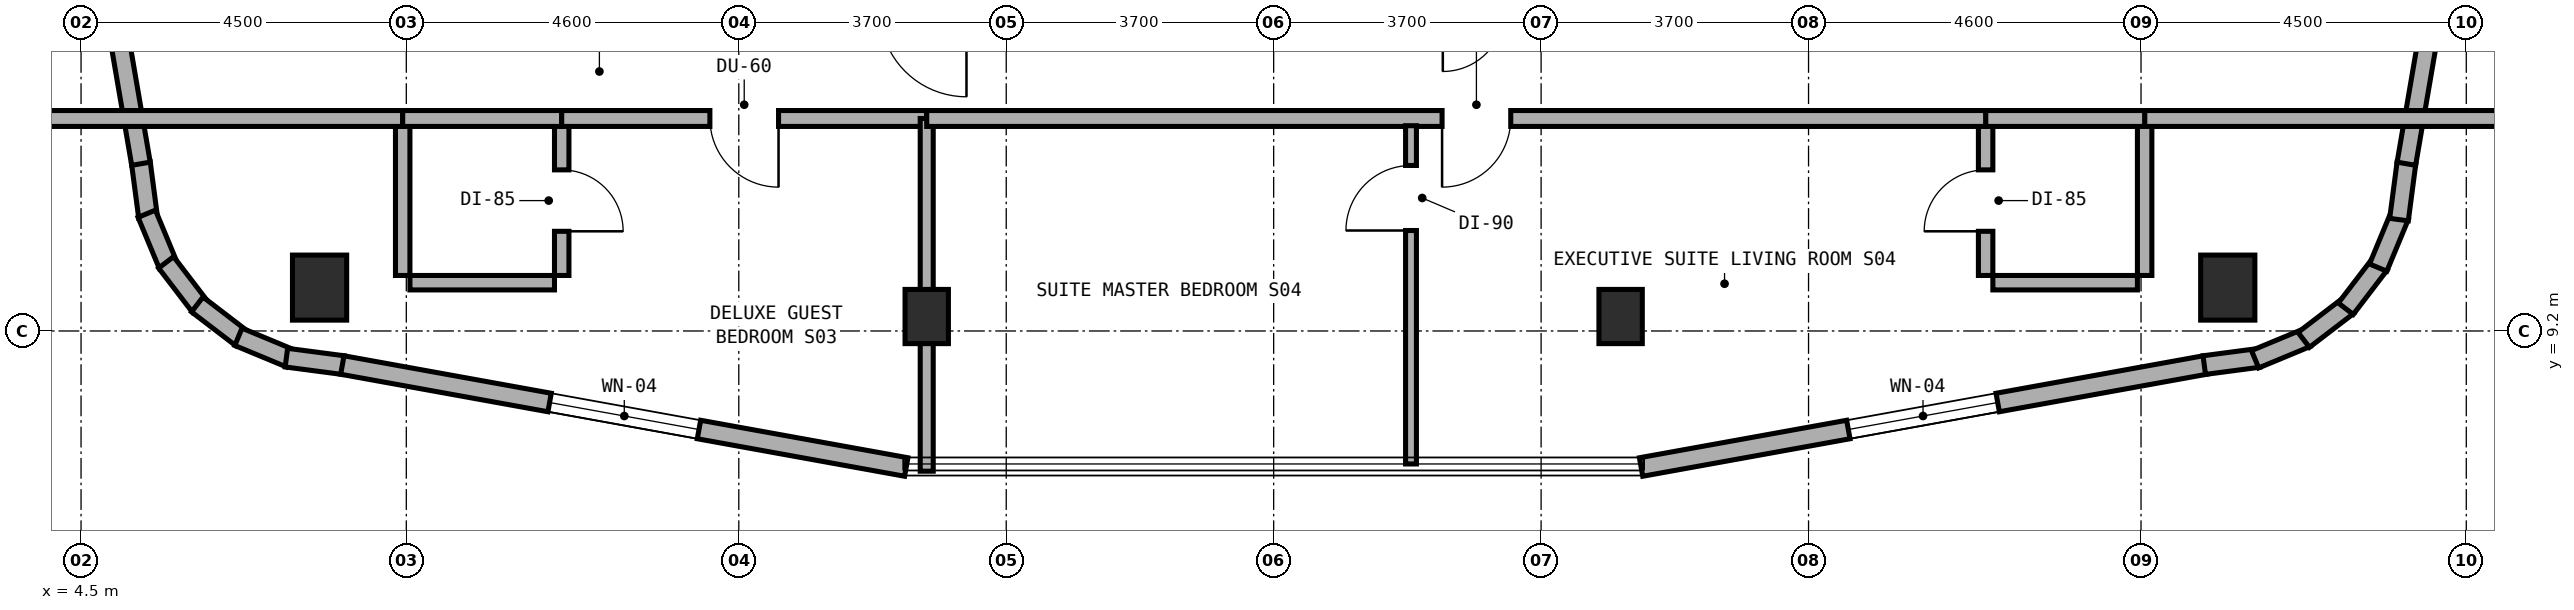
"""IFC4 building model, lengths in metres.
Left out: names, types, materials, properties, quantities, classifications, styles, units other than length and angle.
Written with IfcOpenShell. Run it as: python <this file> out.ifc"""

import sys

from ifc_helpers import new_model, si_unit, direction, frame, frame_2d, origin, origin_2d, place, context, subcontext, project, spatial, rectangle, extrude, element, fill, save


model = new_model("IFC4")
c1 = context("Model", 3, precision=1e-05, world=origin(), true_north=direction((0.0, 1.0)))
c2 = subcontext(c1, "Body", "Model", "MODEL_VIEW")
j1 = project(units=[si_unit("LENGTHUNIT", "METRE"), si_unit("PLANEANGLEUNIT", "RADIAN")], contexts=[c1])
p1 = place(None, origin())
s1 = spatial("IfcSite", under=j1, at=p1, CompositionType="ELEMENT")
p2 = place(p1, origin())
s2 = spatial("IfcBuilding", under=s1, at=p2, CompositionType="ELEMENT")
p3 = place(p2, frame((0.0, 0.0, 257.6)))
s3 = spatial("IfcBuildingStorey", under=s2, at=p3, CompositionType="ELEMENT", Elevation=257.6)
for number, where, z_axis, x_axis in (
    (1, (16.2, 9.4, 0.0), (0.0, 0.0, 1.0), (1.0, 0.0, 0.0)),
    (2, (25.8, 9.4, 0.0), (0.0, 0.0, 1.0), (1.0, 0.0, 0.0)),
):
    element("IfcColumn", number, at=place(p3, frame(where, z_axis=z_axis, x_axis=x_axis)), inside=s3, PredefinedType="COLUMN", context=c2, shape_type="SweptSolid", body=[
        extrude(rectangle(XDim=0.6, YDim=0.75, at=origin_2d()), origin(), (0.0, 0.0, 1.0), 3.6),
    ])
for number, where, z_axis, x_axis in (
    (3, (7.8, 9.8, 0.0), (0.0, 0.0, 1.0), (1.0, 0.0, 0.0)),
    (4, (34.2, 9.8, 0.0), (0.0, 0.0, 1.0), (1.0, 0.0, 0.0)),
):
    element("IfcColumn", number, at=place(p3, frame(where, z_axis=z_axis, x_axis=x_axis)), inside=s3, PredefinedType="COLUMN", context=c2, shape_type="SweptSolid", body=[
        extrude(rectangle(XDim=0.75, YDim=0.9, at=origin_2d()), origin(), (0.0, 0.0, 1.0), 3.6),
    ])
p4 = place(p3, frame((5.328, 11.525, 0.0), z_axis=(0.0, 0.0, 1.0), x_axis=(0.131190038694, -0.991357238208, 0.0)))
e5 = element("IfcWall", 5, at=p4, inside=s3, PredefinedType="STANDARD", context=c2, shape_type="SweptSolid", body=[
    extrude(rectangle(XDim=0.756, YDim=0.26, at=frame_2d((0.378, 0.0))), origin(), (0.0, 0.0, 1.0), 3.32),
])
p5 = place(p3, frame((5.409, 10.822, 0.0), z_axis=(0.0, 0.0, 1.0), x_axis=(0.383515061956, -0.923534621578, 0.0)))
e6 = element("IfcWall", 6, at=p5, inside=s3, PredefinedType="STANDARD", context=c2, shape_type="SweptSolid", body=[
    extrude(rectangle(XDim=0.772, YDim=0.26, at=frame_2d((0.386, 0.0))), origin(), (0.0, 0.0, 1.0), 3.32),
])
for number, where, z_axis, x_axis in (
    (7, (5.677, 10.149, 0.0), (0.0, 0.0, 1.0), (0.608, -0.794, 0.0)),
    (8, (6.108, 9.567, 0.0), (0.0, 0.0, 1.0), (0.794, -0.608, 0.0)),
    (9, (6.677, 9.119, 0.0), (0.0, 0.0, 1.0), (0.924, -0.383, 0.0)),
):
    element("IfcWall", number, at=place(p3, frame(where, z_axis=z_axis, x_axis=x_axis)), inside=s3, PredefinedType="STANDARD", context=c2, shape_type="SweptSolid", body=[
        extrude(rectangle(XDim=0.772, YDim=0.26, at=frame_2d((0.386, 0.0))), origin(), (0.0, 0.0, 1.0), 3.32),
    ])
p6 = place(p3, frame((7.341, 8.831, 0.0), z_axis=(0.0, 0.0, 1.0), x_axis=(0.991474252313, -0.130302751316, 0.0)))
e10 = element("IfcWall", 10, at=p6, inside=s3, PredefinedType="STANDARD", context=c2, shape_type="SweptSolid", body=[
    extrude(rectangle(XDim=0.791, YDim=0.26, at=frame_2d((0.396, 0.0))), origin(), (0.0, 0.0, 1.0), 3.32),
])
p7 = place(p3, frame((8.115, 8.729, 0.0), z_axis=(0.0, 0.0, 1.0), x_axis=(0.984039441158, -0.177950493803, 0.0)))
e11 = element("IfcWall", 11, at=p7, inside=s3, PredefinedType="STANDARD", context=c2, shape_type="SweptSolid", body=[
    extrude(rectangle(XDim=7.928, YDim=0.26, at=frame_2d((3.964, 0.0))), origin(), (0.0, 0.0, 1.0), 3.32),
])
p8 = place(p7, frame((2.914, 0.0, 0.85)))
e12 = element("IfcOpeningElement", 12, at=p8, cuts=e11, PredefinedType="OPENING", context=c2, shape_type="SweptSolid", body=[
    extrude(rectangle(XDim=2.1, YDim=1.5, at=frame_2d((1.05, 0.75))), frame((0.0, 0.14, 0.0), z_axis=(0.0, -1.0, 0.0), x_axis=(1.0, 0.0, 0.0)), (0.0, 0.0, 1.0), 0.28),
])
p9 = place(p3, frame((26.083, 7.318, 0.0), z_axis=(0.0, 0.0, 1.0), x_axis=(0.984039441158, 0.177950493803, 0.0)))
e13 = element("IfcWall", 13, at=p9, inside=s3, PredefinedType="STANDARD", context=c2, shape_type="SweptSolid", body=[
    extrude(rectangle(XDim=7.928, YDim=0.26, at=frame_2d((3.964, 0.0))), origin(), (0.0, 0.0, 1.0), 3.32),
])
p10 = place(p9, frame((2.914, 0.0, 0.85)))
e14 = element("IfcOpeningElement", 14, at=p10, cuts=e13, PredefinedType="OPENING", context=c2, shape_type="SweptSolid", body=[
    extrude(rectangle(XDim=2.1, YDim=1.5, at=frame_2d((1.05, 0.75))), frame((0.0, 0.14, 0.0), z_axis=(0.0, -1.0, 0.0), x_axis=(1.0, 0.0, 0.0)), (0.0, 0.0, 1.0), 0.28),
])
p11 = place(p3, frame((33.875, 8.728, 0.0), z_axis=(0.0, 0.0, 1.0), x_axis=(0.99139921394, 0.130872451645, 0.0)))
e15 = element("IfcWall", 15, at=p11, inside=s3, PredefinedType="STANDARD", context=c2, shape_type="SweptSolid", body=[
    extrude(rectangle(XDim=0.756, YDim=0.26, at=frame_2d((0.378, 0.0))), origin(), (0.0, 0.0, 1.0), 3.32),
])
for number, where, z_axis, x_axis in (
    (16, (34.578, 8.809, 0.0), (0.0, 0.0, 1.0), (0.924, 0.383, 0.0)),
    (17, (35.251, 9.077, 0.0), (0.0, 0.0, 1.0), (0.794, 0.608, 0.0)),
    (18, (35.833, 9.508, 0.0), (0.0, 0.0, 1.0), (0.608, 0.794, 0.0)),
    (19, (36.281, 10.077, 0.0), (0.0, 0.0, 1.0), (0.383, 0.924, 0.0)),
):
    element("IfcWall", number, at=place(p3, frame(where, z_axis=z_axis, x_axis=x_axis)), inside=s3, PredefinedType="STANDARD", context=c2, shape_type="SweptSolid", body=[
        extrude(rectangle(XDim=0.772, YDim=0.26, at=frame_2d((0.386, 0.0))), origin(), (0.0, 0.0, 1.0), 3.32),
    ])
p12 = place(p3, frame((36.569, 10.741, 0.0), z_axis=(0.0, 0.0, 1.0), x_axis=(0.130302751316, 0.991474252313, 0.0)))
e20 = element("IfcWall", 20, at=p12, inside=s3, PredefinedType="STANDARD", context=c2, shape_type="SweptSolid", body=[
    extrude(rectangle(XDim=0.791, YDim=0.26, at=frame_2d((0.396, 0.0))), origin(), (0.0, 0.0, 1.0), 3.32),
])
p13 = place(p3, frame((36.671, 11.514, 0.0), z_axis=(0.0, 0.0, 1.0), x_axis=(0.169038545376, 0.985609440994, 0.0)))
e21 = element("IfcWall", 21, at=p13, inside=s3, PredefinedType="STANDARD", context=c2, shape_type="SweptSolid", body=[
    extrude(rectangle(XDim=8.342, YDim=0.26, at=frame_2d((4.171, 0.0))), origin(), (0.0, 0.0, 1.0), 3.32),
])
p14 = place(p13, frame((4.156, 0.0, 0.85)))
e22 = element("IfcOpeningElement", 22, at=p14, cuts=e21, PredefinedType="OPENING", context=c2, shape_type="SweptSolid", body=[
    extrude(rectangle(XDim=2.1, YDim=1.5, at=frame_2d((1.05, 0.75))), frame((0.0, 0.14, 0.0), z_axis=(0.0, -1.0, 0.0), x_axis=(1.0, 0.0, 0.0)), (0.0, 0.0, 1.0), 0.28),
])
p15 = place(p3, frame((3.919, 19.736, 0.0), z_axis=(0.0, 0.0, 1.0), x_axis=(0.169038545376, -0.985609440994, 0.0)))
e23 = element("IfcWall", 23, at=p15, inside=s3, PredefinedType="STANDARD", context=c2, shape_type="SweptSolid", body=[
    extrude(rectangle(XDim=8.342, YDim=0.26, at=frame_2d((4.171, 0.0))), origin(), (0.0, 0.0, 1.0), 3.32),
])
p16 = place(p15, frame((2.746, 0.0, 0.85)))
e24 = element("IfcOpeningElement", 24, at=p16, cuts=e23, PredefinedType="OPENING", context=c2, shape_type="SweptSolid", body=[
    extrude(rectangle(XDim=2.1, YDim=1.5, at=frame_2d((1.05, 0.75))), frame((0.0, 0.14, 0.0), z_axis=(0.0, -1.0, 0.0), x_axis=(1.0, 0.0, 0.0)), (0.0, 0.0, 1.0), 0.28),
])
p17 = place(p3, frame((11.15, 9.968, 0.0), z_axis=(0.0, 0.0, 1.0), x_axis=(0.0, 1.0, 0.0)))
e25 = element("IfcWall", 25, at=p17, inside=s3, PredefinedType="PLUMBINGWALL", context=c2, shape_type="SweptSolid", body=[
    extrude(rectangle(XDim=2.072, YDim=0.2, at=frame_2d((1.036, 0.0))), origin(), (0.0, 0.0, 1.0), 2.895),
])
p18 = place(p17, frame((0.611, 0.0, 0.0)))
e26 = element("IfcOpeningElement", 26, at=p18, cuts=e25, PredefinedType="OPENING", context=c2, shape_type="SweptSolid", body=[
    extrude(rectangle(XDim=0.85, YDim=2.1, at=frame_2d((0.425, 1.05))), frame((0.0, 0.11, 0.0), z_axis=(0.0, -1.0, 0.0), x_axis=(1.0, 0.0, 0.0)), (0.0, 0.0, 1.0), 0.22),
])
p19 = place(p3, frame((9.05, 9.868, 0.0), z_axis=(0.0, 0.0, 1.0), x_axis=(1.0, 0.0, 0.0)))
e27 = element("IfcWall", 27, at=p19, inside=s3, PredefinedType="PLUMBINGWALL", context=c2, shape_type="SweptSolid", body=[
    extrude(rectangle(XDim=2.0, YDim=0.2, at=frame_2d((1.0, 0.0))), origin(), (0.0, 0.0, 1.0), 3.015),
])
p20 = place(p3, frame((8.95, 9.968, 0.0), z_axis=(0.0, 0.0, 1.0), x_axis=(0.0, 1.0, 0.0)))
e28 = element("IfcWall", 28, at=p20, inside=s3, PredefinedType="PLUMBINGWALL", context=c2, shape_type="SweptSolid", body=[
    extrude(rectangle(XDim=2.072, YDim=0.2, at=frame_2d((1.036, 0.0))), origin(), (0.0, 0.0, 1.0), 2.895),
])
p21 = place(p3, frame((3.96, 12.14, 0.0), z_axis=(0.0, 0.0, 1.0), x_axis=(1.0, 0.0, 0.0)))
e29 = element("IfcWall", 29, at=p21, inside=s3, PredefinedType="SOLIDWALL", context=c2, shape_type="SweptSolid", body=[
    extrude(rectangle(XDim=4.99, YDim=0.22, at=frame_2d((2.495, 0.0))), origin(), (0.0, 0.0, 1.0), 2.795),
])
p22 = place(p3, frame((8.95, 12.14, 0.0), z_axis=(0.0, 0.0, 1.0), x_axis=(1.0, 0.0, 0.0)))
e30 = element("IfcWall", 30, at=p22, inside=s3, PredefinedType="SOLIDWALL", context=c2, shape_type="SweptSolid", body=[
    extrude(rectangle(XDim=2.2, YDim=0.22, at=frame_2d((1.1, 0.0))), origin(), (0.0, 0.0, 1.0), 3.32),
])
p23 = place(p3, frame((11.15, 12.14, 0.0), z_axis=(0.0, 0.0, 1.0), x_axis=(1.0, 0.0, 0.0)))
e31 = element("IfcWall", 31, at=p23, inside=s3, PredefinedType="SOLIDWALL", context=c2, shape_type="SweptSolid", body=[
    extrude(rectangle(XDim=5.05, YDim=0.22, at=frame_2d((2.525, 0.0))), origin(), (0.0, 0.0, 1.0), 2.795),
])
p24 = place(p23, frame((2.05, 0.0, 0.0)))
e32 = element("IfcOpeningElement", 32, at=p24, cuts=e31, PredefinedType="OPENING", context=c2, shape_type="SweptSolid", body=[
    extrude(rectangle(XDim=0.95, YDim=2.1, at=frame_2d((0.475, 1.05))), frame((0.0, 0.12, 0.0), z_axis=(0.0, -1.0, 0.0), x_axis=(1.0, 0.0, 0.0)), (0.0, 0.0, 1.0), 0.24),
])
p25 = place(p3, frame((16.2, 7.26, 0.0), z_axis=(0.0, 0.0, 1.0), x_axis=(0.0, 1.0, 0.0)))
e33 = element("IfcWall", 33, at=p25, inside=s3, PredefinedType="SOLIDWALL", context=c2, shape_type="SweptSolid", body=[
    extrude(rectangle(XDim=4.88, YDim=0.18, at=frame_2d((2.44, 0.0))), origin(), (0.0, 0.0, 1.0), 2.795),
])
p26 = place(p3, frame((30.85, 9.968, 0.0), z_axis=(0.0, 0.0, 1.0), x_axis=(0.0, 1.0, 0.0)))
e34 = element("IfcWall", 34, at=p26, inside=s3, PredefinedType="PLUMBINGWALL", context=c2, shape_type="SweptSolid", body=[
    extrude(rectangle(XDim=2.072, YDim=0.2, at=frame_2d((1.036, 0.0))), origin(), (0.0, 0.0, 1.0), 2.895),
])
p27 = place(p26, frame((0.611, 0.0, 0.0)))
e35 = element("IfcOpeningElement", 35, at=p27, cuts=e34, PredefinedType="OPENING", context=c2, shape_type="SweptSolid", body=[
    extrude(rectangle(XDim=0.85, YDim=2.1, at=frame_2d((0.425, 1.05))), frame((0.0, 0.11, 0.0), z_axis=(0.0, -1.0, 0.0), x_axis=(1.0, 0.0, 0.0)), (0.0, 0.0, 1.0), 0.22),
])
p28 = place(p3, frame((30.95, 9.868, 0.0), z_axis=(0.0, 0.0, 1.0), x_axis=(1.0, 0.0, 0.0)))
e36 = element("IfcWall", 36, at=p28, inside=s3, PredefinedType="PLUMBINGWALL", context=c2, shape_type="SweptSolid", body=[
    extrude(rectangle(XDim=2.0, YDim=0.2, at=frame_2d((1.0, 0.0))), origin(), (0.0, 0.0, 1.0), 3.015),
])
p29 = place(p3, frame((33.05, 9.968, 0.0), z_axis=(0.0, 0.0, 1.0), x_axis=(0.0, 1.0, 0.0)))
e37 = element("IfcWall", 37, at=p29, inside=s3, PredefinedType="PLUMBINGWALL", context=c2, shape_type="SweptSolid", body=[
    extrude(rectangle(XDim=2.072, YDim=0.2, at=frame_2d((1.036, 0.0))), origin(), (0.0, 0.0, 1.0), 2.895),
])
p30 = place(p3, frame((33.05, 12.14, 0.0), z_axis=(0.0, 0.0, 1.0), x_axis=(1.0, 0.0, 0.0)))
e38 = element("IfcWall", 38, at=p30, inside=s3, PredefinedType="SOLIDWALL", context=c2, shape_type="SweptSolid", body=[
    extrude(rectangle(XDim=4.99, YDim=0.22, at=frame_2d((2.495, 0.0))), origin(), (0.0, 0.0, 1.0), 2.795),
])
p31 = place(p3, frame((30.85, 12.14, 0.0), z_axis=(0.0, 0.0, 1.0), x_axis=(1.0, 0.0, 0.0)))
e39 = element("IfcWall", 39, at=p31, inside=s3, PredefinedType="SOLIDWALL", context=c2, shape_type="SweptSolid", body=[
    extrude(rectangle(XDim=2.2, YDim=0.22, at=frame_2d((1.1, 0.0))), origin(), (0.0, 0.0, 1.0), 3.32),
])
p32 = place(p3, frame((16.2, 12.14, 0.0), z_axis=(0.0, 0.0, 1.0), x_axis=(1.0, 0.0, 0.0)))
e40 = element("IfcWall", 40, at=p32, inside=s3, PredefinedType="SOLIDWALL", context=c2, shape_type="SweptSolid", body=[
    extrude(rectangle(XDim=14.65, YDim=0.22, at=frame_2d((7.325, 0.0))), origin(), (0.0, 0.0, 1.0), 2.795),
])
p33 = place(p32, frame((7.13, 0.0, 0.0)))
e41 = element("IfcOpeningElement", 41, at=p33, cuts=e40, PredefinedType="OPENING", context=c2, shape_type="SweptSolid", body=[
    extrude(rectangle(XDim=0.95, YDim=2.1, at=frame_2d((0.475, 1.05))), frame((0.0, 0.12, 0.0), z_axis=(0.0, -1.0, 0.0), x_axis=(1.0, 0.0, 0.0)), (0.0, 0.0, 1.0), 0.24),
])
p34 = place(p3, frame((22.9, 7.36, 0.0), z_axis=(0.0, 0.0, 1.0), x_axis=(0.0, 1.0, 0.0)))
e42 = element("IfcWall", 42, at=p34, inside=s3, PredefinedType="PARTITIONING", context=c2, shape_type="SweptSolid", body=[
    extrude(rectangle(XDim=4.68, YDim=0.15, at=frame_2d((2.34, 0.0))), origin(), (0.0, 0.0, 1.0), 2.895),
])
p35 = place(p34, frame((3.23, 0.0, 0.0)))
e43 = element("IfcOpeningElement", 43, at=p35, cuts=e42, PredefinedType="OPENING", context=c2, shape_type="SweptSolid", body=[
    extrude(rectangle(XDim=0.9, YDim=2.1, at=frame_2d((0.45, 1.05))), frame((0.0, 0.085, 0.0), z_axis=(0.0, -1.0, 0.0), x_axis=(1.0, 0.0, 0.0)), (0.0, 0.0, 1.0), 0.17),
])
p36 = place(p8, origin())
e44 = element("IfcWindow", 44, at=p36, inside=s3, PartitioningType="SINGLE_PANEL", PredefinedType="WINDOW", context=c2, shape_type="SweptSolid", body=[
    extrude(rectangle(XDim=2.1, YDim=1.5, at=frame_2d((1.05, 0.75))), frame((0.0, 0.03, 0.0), z_axis=(0.0, -1.0, 0.0), x_axis=(1.0, 0.0, 0.0)), (0.0, 0.0, 1.0), 0.06),
])
fill(e12, e44)
p37 = place(p10, origin())
e45 = element("IfcWindow", 45, at=p37, inside=s3, PartitioningType="SINGLE_PANEL", PredefinedType="WINDOW", context=c2, shape_type="SweptSolid", body=[
    extrude(rectangle(XDim=2.1, YDim=1.5, at=frame_2d((1.05, 0.75))), frame((0.0, 0.03, 0.0), z_axis=(0.0, -1.0, 0.0), x_axis=(1.0, 0.0, 0.0)), (0.0, 0.0, 1.0), 0.06),
])
fill(e14, e45)
p38 = place(p18, frame((0.85, 0.0, 0.0), z_axis=(0.0, 0.0, 1.0), x_axis=(-1.0, 0.0, 0.0)))
e46 = element("IfcDoor", 46, at=p38, inside=s3, OperationType="SINGLE_SWING_RIGHT", PredefinedType="DOOR", context=c2, shape_type="SweptSolid", body=[
    extrude(rectangle(XDim=0.85, YDim=2.1, at=frame_2d((0.425, 1.05))), frame((0.0, 0.025, 0.0), z_axis=(0.0, -1.0, 0.0), x_axis=(1.0, 0.0, 0.0)), (0.0, 0.0, 1.0), 0.05),
])
fill(e26, e46)
p39 = place(p24, frame((0.95, 0.0, 0.0), z_axis=(0.0, 0.0, 1.0), x_axis=(-1.0, 0.0, 0.0)))
e47 = element("IfcDoor", 47, at=p39, inside=s3, OperationType="SINGLE_SWING_LEFT", PredefinedType="DOOR", context=c2, shape_type="SweptSolid", body=[
    extrude(rectangle(XDim=0.95, YDim=2.1, at=frame_2d((0.475, 1.05))), frame((0.0, 0.025, 0.0), z_axis=(0.0, -1.0, 0.0), x_axis=(1.0, 0.0, 0.0)), (0.0, 0.0, 1.0), 0.05),
])
fill(e32, e47)
p40 = place(p27, origin())
e48 = element("IfcDoor", 48, at=p40, inside=s3, OperationType="SINGLE_SWING_LEFT", PredefinedType="DOOR", context=c2, shape_type="SweptSolid", body=[
    extrude(rectangle(XDim=0.85, YDim=2.1, at=frame_2d((0.425, 1.05))), frame((0.0, 0.025, 0.0), z_axis=(0.0, -1.0, 0.0), x_axis=(1.0, 0.0, 0.0)), (0.0, 0.0, 1.0), 0.05),
])
fill(e35, e48)
p41 = place(p33, frame((0.95, 0.0, 0.0), z_axis=(0.0, 0.0, 1.0), x_axis=(-1.0, 0.0, 0.0)))
e49 = element("IfcDoor", 49, at=p41, inside=s3, OperationType="SINGLE_SWING_RIGHT", PredefinedType="DOOR", context=c2, shape_type="SweptSolid", body=[
    extrude(rectangle(XDim=0.95, YDim=2.1, at=frame_2d((0.475, 1.05))), frame((0.0, 0.025, 0.0), z_axis=(0.0, -1.0, 0.0), x_axis=(1.0, 0.0, 0.0)), (0.0, 0.0, 1.0), 0.05),
])
fill(e41, e49)
p42 = place(p35, origin())
e50 = element("IfcDoor", 50, at=p42, inside=s3, OperationType="SINGLE_SWING_LEFT", PredefinedType="DOOR", context=c2, shape_type="SweptSolid", body=[
    extrude(rectangle(XDim=0.9, YDim=2.1, at=frame_2d((0.45, 1.05))), frame((0.0, 0.025, 0.0), z_axis=(0.0, -1.0, 0.0), x_axis=(1.0, 0.0, 0.0)), (0.0, 0.0, 1.0), 0.05),
])
fill(e43, e50)
save(model, sys.argv[1])
